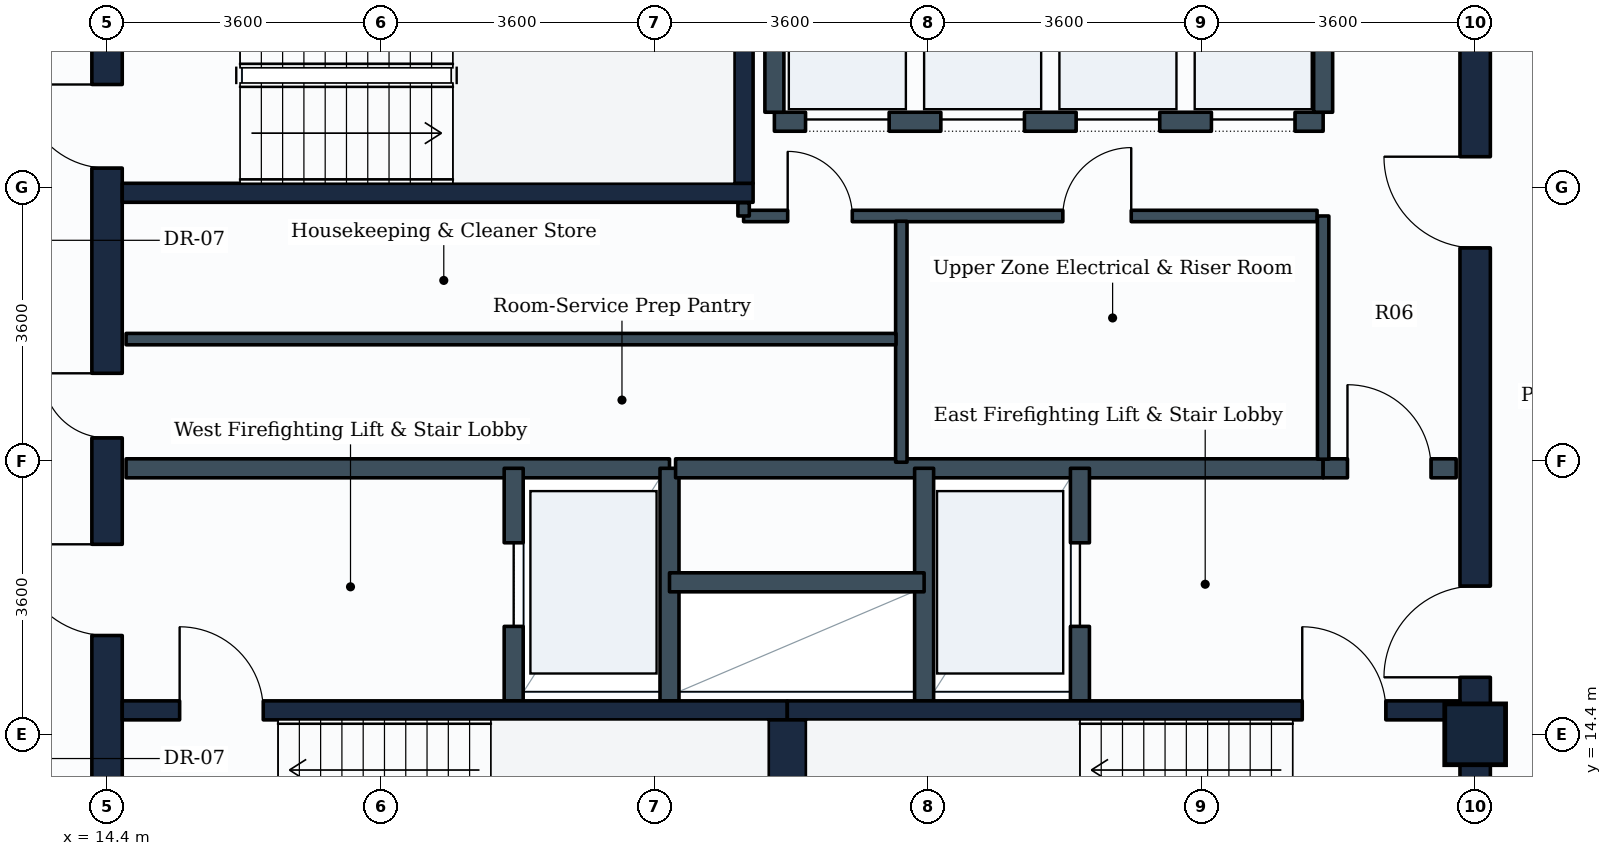
"""IFC4 building model, lengths in metres.
Left out: names, types, materials, properties, quantities, classifications, styles, units other than length and angle.
Written with IfcOpenShell. Run it as: python <this file> out.ifc"""

import sys

from ifc_helpers import new_model, si_unit, direction, frame, frame_2d, origin, origin_2d, place, context, subcontext, project, spatial, rectangle, extrude, element, fill, save


model = new_model("IFC4")
c1 = context("Model", 3, precision=1e-05, world=origin(), true_north=direction((0.0, 1.0)))
c2 = subcontext(c1, "Body", "Model", "MODEL_VIEW")
j1 = project(units=[si_unit("LENGTHUNIT", "METRE"), si_unit("PLANEANGLEUNIT", "RADIAN")], contexts=[c1])
p1 = place(None, origin())
s1 = spatial("IfcSite", under=j1, at=p1, CompositionType="ELEMENT")
p2 = place(p1, origin())
s2 = spatial("IfcBuilding", under=s1, at=p2, CompositionType="ELEMENT")
p3 = place(p2, frame((0.0, 0.0, 255.8)))
s3 = spatial("IfcBuildingStorey", under=s2, at=p3, CompositionType="ELEMENT", Elevation=255.8)
p4 = place(p3, frame((32.4, 14.4, 0.0), z_axis=(0.0, 0.0, 1.0), x_axis=(1.0, 0.0, 0.0)))
e1 = element("IfcColumn", 1, at=p4, inside=s3, PredefinedType="COLUMN", context=c2, shape_type="SweptSolid", body=[
    extrude(rectangle(XDim=0.8, YDim=0.8, at=origin_2d()), origin(), (0.0, 0.0, 1.0), 3.6),
])
p5 = place(p3, frame((14.4, 10.8, 0.0), z_axis=(0.0, 0.0, 1.0), x_axis=(0.0, 1.0, 0.0)))
e2 = element("IfcWall", 2, at=p5, inside=s3, PredefinedType="SHEAR", context=c2, shape_type="SweptSolid", body=[
    extrude(rectangle(XDim=14.4, YDim=0.4, at=frame_2d((7.2, 0.0))), origin(), (0.0, 0.0, 1.0), 3.35),
])
p6 = place(p5, frame((11.05, 0.0, 0.0)))
e3 = element("IfcOpeningElement", 3, at=p6, cuts=e2, PredefinedType="OPENING", context=c2, shape_type="SweptSolid", body=[
    extrude(rectangle(XDim=1.1, YDim=2.1, at=frame_2d((0.55, 1.05))), frame((0.0, 0.21, 0.0), z_axis=(0.0, -1.0, 0.0), x_axis=(1.0, 0.0, 0.0)), (0.0, 0.0, 1.0), 0.42),
])
p7 = place(p5, frame((4.9, 0.0, 0.0)))
e4 = element("IfcOpeningElement", 4, at=p7, cuts=e2, PredefinedType="OPENING", context=c2, shape_type="SweptSolid", body=[
    extrude(rectangle(XDim=1.2, YDim=2.1, at=frame_2d((0.6, 1.05))), frame((0.0, 0.21, 0.0), z_axis=(0.0, -1.0, 0.0), x_axis=(1.0, 0.0, 0.0)), (0.0, 0.0, 1.0), 0.42),
])
p8 = place(p5, frame((7.5, 0.0, 0.0)))
e5 = element("IfcOpeningElement", 5, at=p8, cuts=e2, PredefinedType="OPENING", context=c2, shape_type="SweptSolid", body=[
    extrude(rectangle(XDim=0.85, YDim=2.1, at=frame_2d((0.425, 1.05))), frame((0.0, 0.21, 0.0), z_axis=(0.0, -1.0, 0.0), x_axis=(1.0, 0.0, 0.0)), (0.0, 0.0, 1.0), 0.42),
])
p9 = place(p3, frame((32.4, 10.8, 0.0), z_axis=(0.0, 0.0, 1.0), x_axis=(0.0, 1.0, 0.0)))
e6 = element("IfcWall", 6, at=p9, inside=s3, PredefinedType="SHEAR", context=c2, shape_type="SweptSolid", body=[
    extrude(rectangle(XDim=14.4, YDim=0.4, at=frame_2d((7.2, 0.0))), origin(), (0.0, 0.0, 1.0), 3.35),
])
p10 = place(p9, frame((4.35, 0.0, 0.0)))
e7 = element("IfcOpeningElement", 7, at=p10, cuts=e6, PredefinedType="OPENING", context=c2, shape_type="SweptSolid", body=[
    extrude(rectangle(XDim=1.2, YDim=2.1, at=frame_2d((0.6, 1.05))), frame((0.0, 0.21, 0.0), z_axis=(0.0, -1.0, 0.0), x_axis=(1.0, 0.0, 0.0)), (0.0, 0.0, 1.0), 0.42),
])
p11 = place(p9, frame((10.0, 0.0, 0.0)))
e8 = element("IfcOpeningElement", 8, at=p11, cuts=e6, PredefinedType="OPENING", context=c2, shape_type="SweptSolid", body=[
    extrude(rectangle(XDim=1.2, YDim=2.1, at=frame_2d((0.6, 1.05))), frame((0.0, 0.21, 0.0), z_axis=(0.0, -1.0, 0.0), x_axis=(1.0, 0.0, 0.0)), (0.0, 0.0, 1.0), 0.42),
])
p12 = place(p3, frame((14.6, 14.715, 0.0), z_axis=(0.0, 0.0, 1.0), x_axis=(1.0, 0.0, 0.0)))
e9 = element("IfcWall", 9, at=p12, inside=s3, PredefinedType="SHEAR", context=c2, shape_type="SweptSolid", body=[
    extrude(rectangle(XDim=8.75, YDim=0.25, at=frame_2d((4.375, 0.0))), origin(), (0.0, 0.0, 1.0), 3.35),
])
p13 = place(p12, frame((0.755, 0.0, 0.0)))
e10 = element("IfcOpeningElement", 10, at=p13, cuts=e9, PredefinedType="OPENING", context=c2, shape_type="SweptSolid", body=[
    extrude(rectangle(XDim=1.1, YDim=2.1, at=frame_2d((0.55, 1.05))), frame((0.0, 0.135, 0.0), z_axis=(0.0, -1.0, 0.0), x_axis=(1.0, 0.0, 0.0)), (0.0, 0.0, 1.0), 0.27),
])
p14 = place(p3, frame((23.35, 14.715, 0.0), z_axis=(0.0, 0.0, 1.0), x_axis=(1.0, 0.0, 0.0)))
e11 = element("IfcWall", 11, at=p14, inside=s3, PredefinedType="SHEAR", context=c2, shape_type="SweptSolid", body=[
    extrude(rectangle(XDim=8.85, YDim=0.25, at=frame_2d((4.425, 0.0))), origin(), (0.0, 0.0, 1.0), 3.35),
])
p15 = place(p14, frame((6.775, 0.0, 0.0)))
e12 = element("IfcOpeningElement", 12, at=p15, cuts=e11, PredefinedType="OPENING", context=c2, shape_type="SweptSolid", body=[
    extrude(rectangle(XDim=1.1, YDim=2.1, at=frame_2d((0.55, 1.05))), frame((0.0, 0.135, 0.0), z_axis=(0.0, -1.0, 0.0), x_axis=(1.0, 0.0, 0.0)), (0.0, 0.0, 1.0), 0.27),
])
p16 = place(p3, frame((23.35, 11.75, 0.0), z_axis=(0.0, 0.0, 1.0), x_axis=(0.0, 1.0, 0.0)))
e13 = element("IfcWall", 13, at=p16, inside=s3, PredefinedType="SHEAR", context=c2, shape_type="SweptSolid", body=[
    extrude(rectangle(XDim=2.84, YDim=0.5, at=frame_2d((1.42, 0.0))), origin(), (0.0, 0.0, 1.0), 3.35),
])
p17 = place(p3, frame((14.6, 21.525, 0.0), z_axis=(0.0, 0.0, 1.0), x_axis=(1.0, 0.0, 0.0)))
e14 = element("IfcWall", 14, at=p17, inside=s3, PredefinedType="SHEAR", context=c2, shape_type="SweptSolid", body=[
    extrude(rectangle(XDim=8.3, YDim=0.25, at=frame_2d((4.15, 0.0))), origin(), (0.0, 0.0, 1.0), 3.35),
])
p18 = place(p3, frame((22.775, 21.65, 0.0), z_axis=(0.0, 0.0, 1.0), x_axis=(0.0, 1.0, 0.0)))
e15 = element("IfcWall", 15, at=p18, inside=s3, PredefinedType="SHEAR", context=c2, shape_type="SweptSolid", body=[
    extrude(rectangle(XDim=2.84, YDim=0.25, at=frame_2d((1.42, 0.0))), origin(), (0.0, 0.0, 1.0), 3.35),
])
p19 = place(p3, frame((14.65, 17.9, 0.0), z_axis=(0.0, 0.0, 1.0), x_axis=(1.0, 0.0, 0.0)))
e16 = element("IfcWall", 16, at=p19, inside=s3, PredefinedType="PARTITIONING", context=c2, shape_type="SweptSolid", body=[
    extrude(rectangle(XDim=7.15, YDim=0.25, at=frame_2d((3.575, 0.0))), origin(), (0.0, 0.0, 1.0), 3.335),
])
p20 = place(p3, frame((19.75, 14.84, 0.0), z_axis=(0.0, 0.0, 1.0), x_axis=(0.0, 1.0, 0.0)))
e17 = element("IfcWall", 17, at=p20, inside=s3, PredefinedType="PARTITIONING", context=c2, shape_type="SweptSolid", body=[
    extrude(rectangle(XDim=3.06, YDim=0.25, at=frame_2d((1.53, 0.0))), origin(), (0.0, 0.0, 1.0), 3.335),
])
p21 = place(p20, frame((0.98, 0.0, 0.0)))
e18 = element("IfcOpeningElement", 18, at=p21, cuts=e17, PredefinedType="OPENING", context=c2, shape_type="SweptSolid", body=[
    extrude(rectangle(XDim=1.1, YDim=2.1, at=frame_2d((0.55, 1.05))), frame((0.0, 0.135, 0.0), z_axis=(0.0, -1.0, 0.0), x_axis=(1.0, 0.0, 0.0)), (0.0, 0.0, 1.0), 0.27),
])
p22 = place(p3, frame((21.8, 14.84, 0.0), z_axis=(0.0, 0.0, 1.0), x_axis=(0.0, 1.0, 0.0)))
e19 = element("IfcWall", 19, at=p22, inside=s3, PredefinedType="PARTITIONING", context=c2, shape_type="SweptSolid", body=[
    extrude(rectangle(XDim=3.06, YDim=0.25, at=frame_2d((1.53, 0.0))), origin(), (0.0, 0.0, 1.0), 3.335),
])
p23 = place(p3, frame((21.88, 17.9, 0.0), z_axis=(0.0, 0.0, 1.0), x_axis=(1.0, 0.0, 0.0)))
e20 = element("IfcWall", 20, at=p23, inside=s3, PredefinedType="PARTITIONING", context=c2, shape_type="SweptSolid", body=[
    extrude(rectangle(XDim=8.52, YDim=0.25, at=frame_2d((4.26, 0.0))), origin(), (0.0, 0.0, 1.0), 3.335),
])
p24 = place(p3, frame((30.4, 17.9, 0.0), z_axis=(0.0, 0.0, 1.0), x_axis=(1.0, 0.0, 0.0)))
e21 = element("IfcWall", 21, at=p24, inside=s3, PredefinedType="PARTITIONING", context=c2, shape_type="SweptSolid", body=[
    extrude(rectangle(XDim=1.75, YDim=0.25, at=frame_2d((0.875, 0.0))), origin(), (0.0, 0.0, 1.0), 3.335),
])
p25 = place(p24, frame((0.32, 0.0, 0.0)))
e22 = element("IfcOpeningElement", 22, at=p25, cuts=e21, PredefinedType="OPENING", context=c2, shape_type="SweptSolid", body=[
    extrude(rectangle(XDim=1.1, YDim=2.1, at=frame_2d((0.55, 1.05))), frame((0.0, 0.135, 0.0), z_axis=(0.0, -1.0, 0.0), x_axis=(1.0, 0.0, 0.0)), (0.0, 0.0, 1.0), 0.27),
])
p26 = place(p3, frame((25.15, 14.84, 0.0), z_axis=(0.0, 0.0, 1.0), x_axis=(0.0, 1.0, 0.0)))
e23 = element("IfcWall", 23, at=p26, inside=s3, PredefinedType="PARTITIONING", context=c2, shape_type="SweptSolid", body=[
    extrude(rectangle(XDim=3.06, YDim=0.25, at=frame_2d((1.53, 0.0))), origin(), (0.0, 0.0, 1.0), 3.335),
])
p27 = place(p3, frame((27.2, 14.84, 0.0), z_axis=(0.0, 0.0, 1.0), x_axis=(0.0, 1.0, 0.0)))
e24 = element("IfcWall", 24, at=p27, inside=s3, PredefinedType="PARTITIONING", context=c2, shape_type="SweptSolid", body=[
    extrude(rectangle(XDim=3.06, YDim=0.25, at=frame_2d((1.53, 0.0))), origin(), (0.0, 0.0, 1.0), 3.335),
])
p28 = place(p27, frame((0.98, 0.0, 0.0)))
e25 = element("IfcOpeningElement", 25, at=p28, cuts=e24, PredefinedType="OPENING", context=c2, shape_type="SweptSolid", body=[
    extrude(rectangle(XDim=1.1, YDim=2.1, at=frame_2d((0.55, 1.05))), frame((0.0, 0.135, 0.0), z_axis=(0.0, -1.0, 0.0), x_axis=(1.0, 0.0, 0.0)), (0.0, 0.0, 1.0), 0.27),
])
p29 = place(p3, frame((21.8, 16.4, 0.0), z_axis=(0.0, 0.0, 1.0), x_axis=(1.0, 0.0, 0.0)))
e26 = element("IfcWall", 26, at=p29, inside=s3, PredefinedType="PARTITIONING", context=c2, shape_type="SweptSolid", body=[
    extrude(rectangle(XDim=3.35, YDim=0.25, at=frame_2d((1.675, 0.0))), origin(), (0.0, 0.0, 1.0), 3.335),
])
p30 = place(p3, frame((23.18, 22.46, 0.0), z_axis=(0.0, 0.0, 1.0), x_axis=(1.0, 0.0, 0.0)))
e27 = element("IfcWall", 27, at=p30, inside=s3, PredefinedType="PARTITIONING", context=c2, shape_type="SweptSolid", body=[
    extrude(rectangle(XDim=7.22, YDim=0.25, at=frame_2d((3.61, 0.0))), origin(), (0.0, 0.0, 1.0), 3.335),
])
p31 = place(p30, frame((0.41, 0.0, 0.0)))
e28 = element("IfcOpeningElement", 28, at=p31, cuts=e27, PredefinedType="OPENING", context=c2, shape_type="SweptSolid", body=[
    extrude(rectangle(XDim=1.1, YDim=2.1, at=frame_2d((0.55, 1.05))), frame((0.0, 0.135, 0.0), z_axis=(0.0, -1.0, 0.0), x_axis=(1.0, 0.0, 0.0)), (0.0, 0.0, 1.0), 0.27),
])
p32 = place(p30, frame((2.19, 0.0, 0.0)))
e29 = element("IfcOpeningElement", 29, at=p32, cuts=e27, PredefinedType="OPENING", context=c2, shape_type="SweptSolid", body=[
    extrude(rectangle(XDim=1.1, YDim=2.1, at=frame_2d((0.55, 1.05))), frame((0.0, 0.135, 0.0), z_axis=(0.0, -1.0, 0.0), x_axis=(1.0, 0.0, 0.0)), (0.0, 0.0, 1.0), 0.27),
])
p33 = place(p30, frame((3.97, 0.0, 0.0)))
e30 = element("IfcOpeningElement", 30, at=p33, cuts=e27, PredefinedType="OPENING", context=c2, shape_type="SweptSolid", body=[
    extrude(rectangle(XDim=1.1, YDim=2.1, at=frame_2d((0.55, 1.05))), frame((0.0, 0.135, 0.0), z_axis=(0.0, -1.0, 0.0), x_axis=(1.0, 0.0, 0.0)), (0.0, 0.0, 1.0), 0.27),
])
p34 = place(p30, frame((5.75, 0.0, 0.0)))
e31 = element("IfcOpeningElement", 31, at=p34, cuts=e27, PredefinedType="OPENING", context=c2, shape_type="SweptSolid", body=[
    extrude(rectangle(XDim=1.1, YDim=2.1, at=frame_2d((0.55, 1.05))), frame((0.0, 0.135, 0.0), z_axis=(0.0, -1.0, 0.0), x_axis=(1.0, 0.0, 0.0)), (0.0, 0.0, 1.0), 0.27),
])
for number, where, z_axis, x_axis in (
    (32, (23.18, 22.585, 0.0), (0.0, 0.0, 1.0), (0.0, 1.0, 0.0)),
    (33, (30.4, 22.585, 0.0), (0.0, 0.0, 1.0), (0.0, 1.0, 0.0)),
):
    element("IfcWall", number, at=place(p3, frame(where, z_axis=z_axis, x_axis=x_axis)), inside=s3, PredefinedType="PARTITIONING", context=c2, shape_type="SweptSolid", body=[
        extrude(rectangle(XDim=2.315, YDim=0.25, at=frame_2d((1.157, 0.0))), origin(), (0.0, 0.0, 1.0), 3.335),
    ])
p35 = place(p3, frame((22.775, 21.22, 0.0), z_axis=(0.0, 0.0, 1.0), x_axis=(1.0, 0.0, 0.0)))
e34 = element("IfcWall", 34, at=p35, inside=s3, PredefinedType="PARTITIONING", context=c2, shape_type="SweptSolid", body=[
    extrude(rectangle(XDim=7.545, YDim=0.15, at=frame_2d((3.772, 0.0))), origin(), (0.0, 0.0, 1.0), 3.335),
])
p36 = place(p35, frame((0.58, 0.0, 0.0)))
e35 = element("IfcOpeningElement", 35, at=p36, cuts=e34, PredefinedType="OPENING", context=c2, shape_type="SweptSolid", body=[
    extrude(rectangle(XDim=0.85, YDim=2.1, at=frame_2d((0.425, 1.05))), frame((0.0, 0.085, 0.0), z_axis=(0.0, -1.0, 0.0), x_axis=(1.0, 0.0, 0.0)), (0.0, 0.0, 1.0), 0.17),
])
p37 = place(p35, frame((4.2, 0.0, 0.0)))
e36 = element("IfcOpeningElement", 36, at=p37, cuts=e34, PredefinedType="OPENING", context=c2, shape_type="SweptSolid", body=[
    extrude(rectangle(XDim=0.9, YDim=2.1, at=frame_2d((0.45, 1.05))), frame((0.0, 0.085, 0.0), z_axis=(0.0, -1.0, 0.0), x_axis=(1.0, 0.0, 0.0)), (0.0, 0.0, 1.0), 0.17),
])
p38 = place(p3, frame((22.775, 21.22, 0.0), z_axis=(0.0, 0.0, 1.0), x_axis=(0.0, 1.0, 0.0)))
e37 = element("IfcWall", 37, at=p38, inside=s3, PredefinedType="PARTITIONING", context=c2, shape_type="SweptSolid", body=[
    extrude(rectangle(XDim=0.175, YDim=0.15, at=frame_2d((0.087, 0.0))), origin(), (0.0, 0.0, 1.0), 3.335),
])
p39 = place(p3, frame((30.4, 18.02, 0.0), z_axis=(0.0, 0.0, 1.0), x_axis=(0.0, 1.0, 0.0)))
e38 = element("IfcWall", 38, at=p39, inside=s3, PredefinedType="PARTITIONING", context=c2, shape_type="SweptSolid", body=[
    extrude(rectangle(XDim=3.2, YDim=0.15, at=frame_2d((1.6, 0.0))), origin(), (0.0, 0.0, 1.0), 3.335),
])
p40 = place(p3, frame((24.85, 17.98, 0.0), z_axis=(0.0, 0.0, 1.0), x_axis=(0.0, 1.0, 0.0)))
e39 = element("IfcWall", 39, at=p40, inside=s3, PredefinedType="PARTITIONING", context=c2, shape_type="SweptSolid", body=[
    extrude(rectangle(XDim=3.17, YDim=0.15, at=frame_2d((1.585, 0.0))), origin(), (0.0, 0.0, 1.0), 3.335),
])
p41 = place(p3, frame((14.65, 19.6, 0.0), z_axis=(0.0, 0.0, 1.0), x_axis=(1.0, 0.0, 0.0)))
e40 = element("IfcWall", 40, at=p41, inside=s3, PredefinedType="PARTITIONING", context=c2, shape_type="SweptSolid", body=[
    extrude(rectangle(XDim=10.13, YDim=0.15, at=frame_2d((5.065, 0.0))), origin(), (0.0, 0.0, 1.0), 3.335),
])
p42 = place(p13, origin())
e41 = element("IfcDoor", 41, at=p42, inside=s3, OperationType="SINGLE_SWING_LEFT", PredefinedType="DOOR", context=c2, shape_type="SweptSolid", body=[
    extrude(rectangle(XDim=1.1, YDim=2.1, at=frame_2d((0.55, 1.05))), frame((0.0, 0.025, 0.0), z_axis=(0.0, -1.0, 0.0), x_axis=(1.0, 0.0, 0.0)), (0.0, 0.0, 1.0), 0.05),
])
fill(e10, e41)
p43 = place(p15, origin())
e42 = element("IfcDoor", 42, at=p43, inside=s3, OperationType="SINGLE_SWING_LEFT", PredefinedType="DOOR", context=c2, shape_type="SweptSolid", body=[
    extrude(rectangle(XDim=1.1, YDim=2.1, at=frame_2d((0.55, 1.05))), frame((0.0, 0.025, 0.0), z_axis=(0.0, -1.0, 0.0), x_axis=(1.0, 0.0, 0.0)), (0.0, 0.0, 1.0), 0.05),
])
fill(e12, e42)
p44 = place(p6, origin())
e43 = element("IfcDoor", 43, at=p44, inside=s3, OperationType="SINGLE_SWING_RIGHT", PredefinedType="DOOR", context=c2, shape_type="SweptSolid", body=[
    extrude(rectangle(XDim=1.1, YDim=2.1, at=frame_2d((0.55, 1.05))), frame((0.0, 0.025, 0.0), z_axis=(0.0, -1.0, 0.0), x_axis=(1.0, 0.0, 0.0)), (0.0, 0.0, 1.0), 0.05),
])
fill(e3, e43)
p45 = place(p21, origin())
e44 = element("IfcDoor", 44, at=p45, inside=s3, OperationType="SLIDING_TO_LEFT", PredefinedType="DOOR", context=c2, shape_type="SweptSolid", body=[
    extrude(rectangle(XDim=1.1, YDim=2.1, at=frame_2d((0.55, 1.05))), frame((0.0, 0.025, 0.0), z_axis=(0.0, -1.0, 0.0), x_axis=(1.0, 0.0, 0.0)), (0.0, 0.0, 1.0), 0.05),
])
fill(e18, e44)
p46 = place(p28, origin())
e45 = element("IfcDoor", 45, at=p46, inside=s3, OperationType="SLIDING_TO_LEFT", PredefinedType="DOOR", context=c2, shape_type="SweptSolid", body=[
    extrude(rectangle(XDim=1.1, YDim=2.1, at=frame_2d((0.55, 1.05))), frame((0.0, 0.025, 0.0), z_axis=(0.0, -1.0, 0.0), x_axis=(1.0, 0.0, 0.0)), (0.0, 0.0, 1.0), 0.05),
])
fill(e25, e45)
p47 = place(p7, origin())
e46 = element("IfcDoor", 46, at=p47, inside=s3, OperationType="SINGLE_SWING_RIGHT", PredefinedType="DOOR", context=c2, shape_type="SweptSolid", body=[
    extrude(rectangle(XDim=1.2, YDim=2.1, at=frame_2d((0.6, 1.05))), frame((0.0, 0.025, 0.0), z_axis=(0.0, -1.0, 0.0), x_axis=(1.0, 0.0, 0.0)), (0.0, 0.0, 1.0), 0.05),
])
fill(e4, e46)
p48 = place(p10, origin())
e47 = element("IfcDoor", 47, at=p48, inside=s3, OperationType="SINGLE_SWING_LEFT", PredefinedType="DOOR", context=c2, shape_type="SweptSolid", body=[
    extrude(rectangle(XDim=1.2, YDim=2.1, at=frame_2d((0.6, 1.05))), frame((0.0, 0.025, 0.0), z_axis=(0.0, -1.0, 0.0), x_axis=(1.0, 0.0, 0.0)), (0.0, 0.0, 1.0), 0.05),
])
fill(e7, e47)
p49 = place(p25, origin())
e48 = element("IfcDoor", 48, at=p49, inside=s3, OperationType="SINGLE_SWING_LEFT", PredefinedType="DOOR", context=c2, shape_type="SweptSolid", body=[
    extrude(rectangle(XDim=1.1, YDim=2.1, at=frame_2d((0.55, 1.05))), frame((0.0, 0.025, 0.0), z_axis=(0.0, -1.0, 0.0), x_axis=(1.0, 0.0, 0.0)), (0.0, 0.0, 1.0), 0.05),
])
fill(e22, e48)
p50 = place(p31, origin())
e49 = element("IfcDoor", 49, at=p50, inside=s3, OperationType="SLIDING_TO_LEFT", PredefinedType="DOOR", context=c2, shape_type="SweptSolid", body=[
    extrude(rectangle(XDim=1.1, YDim=2.1, at=frame_2d((0.55, 1.05))), frame((0.0, 0.025, 0.0), z_axis=(0.0, -1.0, 0.0), x_axis=(1.0, 0.0, 0.0)), (0.0, 0.0, 1.0), 0.05),
])
fill(e28, e49)
p51 = place(p32, origin())
e50 = element("IfcDoor", 50, at=p51, inside=s3, OperationType="SLIDING_TO_LEFT", PredefinedType="DOOR", context=c2, shape_type="SweptSolid", body=[
    extrude(rectangle(XDim=1.1, YDim=2.1, at=frame_2d((0.55, 1.05))), frame((0.0, 0.025, 0.0), z_axis=(0.0, -1.0, 0.0), x_axis=(1.0, 0.0, 0.0)), (0.0, 0.0, 1.0), 0.05),
])
fill(e29, e50)
p52 = place(p33, origin())
e51 = element("IfcDoor", 51, at=p52, inside=s3, OperationType="SLIDING_TO_LEFT", PredefinedType="DOOR", context=c2, shape_type="SweptSolid", body=[
    extrude(rectangle(XDim=1.1, YDim=2.1, at=frame_2d((0.55, 1.05))), frame((0.0, 0.025, 0.0), z_axis=(0.0, -1.0, 0.0), x_axis=(1.0, 0.0, 0.0)), (0.0, 0.0, 1.0), 0.05),
])
fill(e30, e51)
p53 = place(p34, origin())
e52 = element("IfcDoor", 52, at=p53, inside=s3, OperationType="SLIDING_TO_LEFT", PredefinedType="DOOR", context=c2, shape_type="SweptSolid", body=[
    extrude(rectangle(XDim=1.1, YDim=2.1, at=frame_2d((0.55, 1.05))), frame((0.0, 0.025, 0.0), z_axis=(0.0, -1.0, 0.0), x_axis=(1.0, 0.0, 0.0)), (0.0, 0.0, 1.0), 0.05),
])
fill(e31, e52)
p54 = place(p11, origin())
e53 = element("IfcDoor", 53, at=p54, inside=s3, OperationType="SINGLE_SWING_RIGHT", PredefinedType="DOOR", context=c2, shape_type="SweptSolid", body=[
    extrude(rectangle(XDim=1.2, YDim=2.1, at=frame_2d((0.6, 1.05))), frame((0.0, 0.025, 0.0), z_axis=(0.0, -1.0, 0.0), x_axis=(1.0, 0.0, 0.0)), (0.0, 0.0, 1.0), 0.05),
])
fill(e8, e53)
p55 = place(p8, origin())
e54 = element("IfcDoor", 54, at=p55, inside=s3, OperationType="SINGLE_SWING_RIGHT", PredefinedType="DOOR", context=c2, shape_type="SweptSolid", body=[
    extrude(rectangle(XDim=0.85, YDim=2.1, at=frame_2d((0.425, 1.05))), frame((0.0, 0.025, 0.0), z_axis=(0.0, -1.0, 0.0), x_axis=(1.0, 0.0, 0.0)), (0.0, 0.0, 1.0), 0.05),
])
fill(e5, e54)
p56 = place(p36, origin())
e55 = element("IfcDoor", 55, at=p56, inside=s3, OperationType="SINGLE_SWING_LEFT", PredefinedType="DOOR", context=c2, shape_type="SweptSolid", body=[
    extrude(rectangle(XDim=0.85, YDim=2.1, at=frame_2d((0.425, 1.05))), frame((0.0, 0.025, 0.0), z_axis=(0.0, -1.0, 0.0), x_axis=(1.0, 0.0, 0.0)), (0.0, 0.0, 1.0), 0.05),
])
fill(e35, e55)
p57 = place(p37, origin())
e56 = element("IfcDoor", 56, at=p57, inside=s3, OperationType="SINGLE_SWING_RIGHT", PredefinedType="DOOR", context=c2, shape_type="SweptSolid", body=[
    extrude(rectangle(XDim=0.9, YDim=2.1, at=frame_2d((0.45, 1.05))), frame((0.0, 0.025, 0.0), z_axis=(0.0, -1.0, 0.0), x_axis=(1.0, 0.0, 0.0)), (0.0, 0.0, 1.0), 0.05),
])
fill(e36, e56)
save(model, sys.argv[1])
